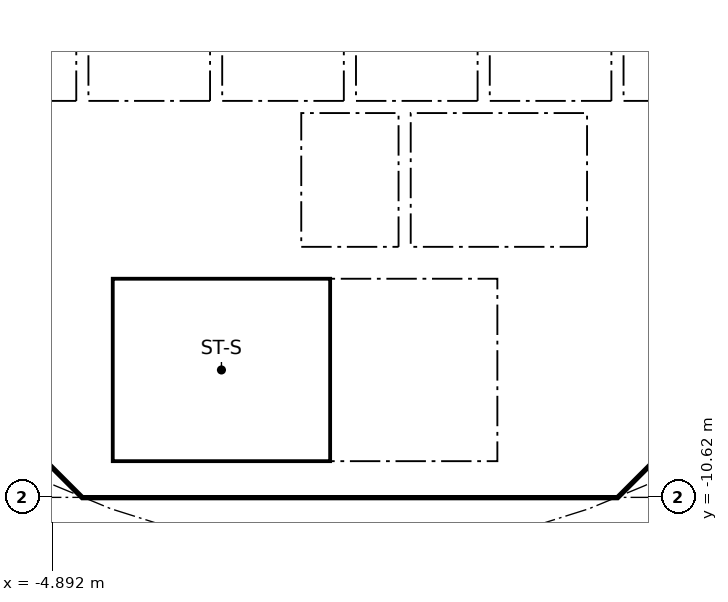
"""IFC4 building model, lengths in metres.
Left out: names, types, materials, properties, quantities, classifications, styles, units other than length and angle.
Written with IfcOpenShell. Run it as: python <this file> out.ifc"""

import sys

from ifc_helpers import new_model, si_unit, direction, frame, frame_2d, origin, place, context, subcontext, project, spatial, polyline, rectangle, outline, extrude, element, fill, save


model = new_model("IFC4")
c1 = context("Model", 3, precision=1e-05, world=origin(), true_north=direction((0.0, 1.0)))
c2 = subcontext(c1, "Body", "Model", "MODEL_VIEW")
j1 = project(units=[si_unit("LENGTHUNIT", "METRE"), si_unit("PLANEANGLEUNIT", "RADIAN")], contexts=[c1])
p1 = place(None, origin())
s1 = spatial("IfcSite", under=j1, at=p1, CompositionType="ELEMENT")
p2 = place(p1, origin())
s2 = spatial("IfcBuilding", under=s1, at=p2, CompositionType="ELEMENT")
p3 = place(p2, frame((0.0, 0.0, 88.1)))
s3 = spatial("IfcBuildingStorey", under=s2, at=p3, CompositionType="ELEMENT", Elevation=88.1)
p4 = place(p3, frame((-9.988, -4.613, 0.0), z_axis=(0.0, 0.0, 1.0), x_axis=(0.707106781187, -0.707106781187, 0.0)))
e1 = element("IfcWall", 1, at=p4, inside=s3, PredefinedType="SHEAR", context=c2, shape_type="SweptSolid", body=[
    extrude(rectangle(XDim=7.602, YDim=0.6, at=frame_2d((3.801, 0.0))), origin(), (0.0, 0.0, 1.0), 3.44),
])
p5 = place(p4, frame((6.151, 0.0, 0.0)))
e2 = element("IfcOpeningElement", 2, at=p5, cuts=e1, PredefinedType="OPENING", context=c2, shape_type="SweptSolid", body=[
    extrude(rectangle(XDim=1.1, YDim=2.1, at=frame_2d((0.55, 1.05))), frame((0.0, 0.31, 0.0), z_axis=(0.0, -1.0, 0.0), x_axis=(1.0, 0.0, 0.0)), (0.0, 0.0, 1.0), 0.62),
])
p6 = place(p3, frame((4.613, -9.988, 0.0), z_axis=(0.0, 0.0, 1.0), x_axis=(0.707106781187, 0.707106781187, 0.0)))
e3 = element("IfcWall", 3, at=p6, inside=s3, PredefinedType="SHEAR", context=c2, shape_type="SweptSolid", body=[
    extrude(rectangle(XDim=7.602, YDim=0.6, at=frame_2d((3.801, 0.0))), origin(), (0.0, 0.0, 1.0), 3.44),
])
p7 = place(p6, frame((3.201, 0.0, 0.0)))
e4 = element("IfcOpeningElement", 4, at=p7, cuts=e3, PredefinedType="OPENING", context=c2, shape_type="SweptSolid", body=[
    extrude(rectangle(XDim=1.2, YDim=2.1, at=frame_2d((0.6, 1.05))), frame((0.0, 0.31, 0.0), z_axis=(0.0, -1.0, 0.0), x_axis=(1.0, 0.0, 0.0)), (0.0, 0.0, 1.0), 0.62),
])
p8 = place(p3, frame((4.0, -10.025, 0.0), z_axis=(0.0, 0.0, 1.0), x_axis=(0.0, 1.0, 0.0)))
e5 = element("IfcWall", 5, at=p8, inside=s3, PredefinedType="SOLIDWALL", context=c2, shape_type="SweptSolid", body=[
    extrude(rectangle(XDim=3.0, YDim=0.2, at=frame_2d((1.5, 0.0))), origin(), (0.0, 0.0, 1.0), 3.44),
])
p9 = place(p8, frame((0.975, 0.0, 0.0)))
e6 = element("IfcOpeningElement", 6, at=p9, cuts=e5, PredefinedType="OPENING", context=c2, shape_type="SweptSolid", body=[
    extrude(rectangle(XDim=1.1, YDim=2.1, at=frame_2d((0.55, 1.05))), frame((0.0, 0.11, 0.0), z_axis=(0.0, -1.0, 0.0), x_axis=(1.0, 0.0, 0.0)), (0.0, 0.0, 1.0), 0.22),
])
p10 = place(p3, frame((4.0, -6.5, 0.0), z_axis=(0.0, 0.0, 1.0), x_axis=(0.0, 1.0, 0.0)))
e7 = element("IfcWall", 7, at=p10, inside=s3, PredefinedType="SOLIDWALL", context=c2, shape_type="SweptSolid", body=[
    extrude(rectangle(XDim=2.2, YDim=0.2, at=frame_2d((1.1, 0.0))), origin(), (0.0, 0.0, 1.0), 3.44),
])
p11 = place(p10, frame((0.55, 0.0, 0.0)))
e8 = element("IfcOpeningElement", 8, at=p11, cuts=e7, PredefinedType="OPENING", context=c2, shape_type="SweptSolid", body=[
    extrude(rectangle(XDim=1.1, YDim=2.1, at=frame_2d((0.55, 1.05))), frame((0.0, 0.11, 0.0), z_axis=(0.0, -1.0, 0.0), x_axis=(1.0, 0.0, 0.0)), (0.0, 0.0, 1.0), 0.22),
])
p12 = place(p3, frame((-4.0, -6.5, 0.0), z_axis=(0.0, 0.0, 1.0), x_axis=(0.0, 1.0, 0.0)))
e9 = element("IfcWall", 9, at=p12, inside=s3, PredefinedType="SOLIDWALL", context=c2, shape_type="SweptSolid", body=[
    extrude(rectangle(XDim=2.2, YDim=0.2, at=frame_2d((1.1, 0.0))), origin(), (0.0, 0.0, 1.0), 3.44),
])
p13 = place(p12, frame((0.65, 0.0, 0.0)))
e10 = element("IfcOpeningElement", 10, at=p13, cuts=e9, PredefinedType="OPENING", context=c2, shape_type="SweptSolid", body=[
    extrude(rectangle(XDim=0.9, YDim=2.1, at=frame_2d((0.45, 1.05))), frame((0.0, 0.11, 0.0), z_axis=(0.0, -1.0, 0.0), x_axis=(1.0, 0.0, 0.0)), (0.0, 0.0, 1.0), 0.22),
])
p14 = place(p3, origin())
e11 = element("IfcWall", 11, at=p14, inside=s3, PredefinedType="SHEAR", context=c2, shape_type="SweptSolid", body=[
    extrude(outline(polyline([(-4.152, -10.025), (4.152, -10.025), (4.401, -9.776), (4.825, -10.2), (4.401, -10.625), (-4.401, -10.625), (-4.825, -10.2), (-4.401, -9.776), (-4.152, -10.025)])), origin(), (0.0, 0.0, 1.0), 3.44),
])
for number, where, z_axis, x_axis in (
    (12, (-0.9, -6.5, 0.0), (0.0, 0.0, 1.0), (0.0, 1.0, 0.0)),
    (13, (0.9, -6.5, 0.0), (0.0, 0.0, 1.0), (0.0, 1.0, 0.0)),
):
    element("IfcWall", number, at=place(p3, frame(where, z_axis=z_axis, x_axis=x_axis)), inside=s3, PredefinedType="SOLIDWALL", context=c2, shape_type="SweptSolid", body=[
        extrude(rectangle(XDim=2.2, YDim=0.2, at=frame_2d((1.1, 0.0))), origin(), (0.0, 0.0, 1.0), 3.44),
    ])
p15 = place(p3, origin())
e14 = element("IfcWall", 14, at=p15, inside=s3, PredefinedType="SOLIDWALL", context=c2, shape_type="SweptSolid", body=[
    extrude(outline(polyline([(-6.7, -2.1), (-6.5, -2.1), (-6.5, -4.1), (-4.5, -4.1), (-4.5, -2.1), (-4.3, -2.1), (-4.3, -4.1), (-2.3, -4.1), (-2.3, -2.1), (-2.1, -2.1), (-2.1, -4.1), (-0.1, -4.1), (-0.1, -2.1), (0.1, -2.1), (0.1, -4.1), (2.1, -4.1), (2.1, -2.1), (2.3, -2.1), (2.3, -4.1), (4.3, -4.1), (4.3, -2.1), (4.5, -2.1), (4.5, -4.1), (6.5, -4.1), (6.5, -2.1), (6.7, -2.1), (6.7, -4.3), (-6.7, -4.3), (-6.7, -2.1)])), origin(), (0.0, 0.0, 1.0), 3.44),
])
p16 = place(p3, origin())
e15 = element("IfcWall", 15, at=p16, inside=s3, PredefinedType="SOLIDWALL", context=c2, shape_type="SweptSolid", body=[
    extrude(outline(polyline([(-3.9, -10.025), (-4.1, -10.025), (-4.1, -7.025), (-3.9, -7.025), (-3.9, -10.025)])), origin(), (0.0, 0.0, 1.0), 3.44),
])
p17 = place(p3, origin())
e16 = element("IfcWall", 16, at=p17, inside=s3, PredefinedType="SOLIDWALL", context=c2, shape_type="SweptSolid", body=[
    extrude(outline(polyline([(4.1, -7.025), (-4.1, -7.025), (-4.1, -6.5), (4.1, -6.5), (4.1, -7.025)])), origin(), (0.0, 0.0, 1.0), 3.44),
])
p18 = place(p11, origin())
e17 = element("IfcDoor", 17, at=p18, inside=s3, OperationType="DOUBLE_DOOR_SLIDING", PredefinedType="DOOR", context=c2, shape_type="SweptSolid", body=[
    extrude(rectangle(XDim=1.1, YDim=2.1, at=frame_2d((0.55, 1.05))), frame((0.0, 0.025, 0.0), z_axis=(0.0, -1.0, 0.0), x_axis=(1.0, 0.0, 0.0)), (0.0, 0.0, 1.0), 0.05),
])
fill(e8, e17)
p19 = place(p9, origin())
e18 = element("IfcDoor", 18, at=p19, inside=s3, OperationType="SINGLE_SWING_RIGHT", PredefinedType="DOOR", context=c2, shape_type="SweptSolid", body=[
    extrude(rectangle(XDim=1.1, YDim=2.1, at=frame_2d((0.55, 1.05))), frame((0.0, 0.025, 0.0), z_axis=(0.0, -1.0, 0.0), x_axis=(1.0, 0.0, 0.0)), (0.0, 0.0, 1.0), 0.05),
])
fill(e6, e18)
p20 = place(p13, frame((0.9, 0.0, 0.0), x_axis=(-1.0, 0.0, 0.0)))
e19 = element("IfcDoor", 19, at=p20, inside=s3, OperationType="SINGLE_SWING_LEFT", PredefinedType="DOOR", context=c2, shape_type="SweptSolid", body=[
    extrude(rectangle(XDim=0.9, YDim=2.1, at=frame_2d((0.45, 1.05))), frame((0.0, 0.025, 0.0), z_axis=(0.0, -1.0, 0.0), x_axis=(1.0, 0.0, 0.0)), (0.0, 0.0, 1.0), 0.05),
])
fill(e10, e19)
p21 = place(p5, origin())
e20 = element("IfcDoor", 20, at=p21, inside=s3, OperationType="SINGLE_SWING_LEFT", PredefinedType="DOOR", context=c2, shape_type="SweptSolid", body=[
    extrude(rectangle(XDim=1.1, YDim=2.1, at=frame_2d((0.55, 1.05))), frame((0.0, 0.025, 0.0), z_axis=(0.0, -1.0, 0.0), x_axis=(1.0, 0.0, 0.0)), (0.0, 0.0, 1.0), 0.05),
])
fill(e2, e20)
save(model, sys.argv[1])
